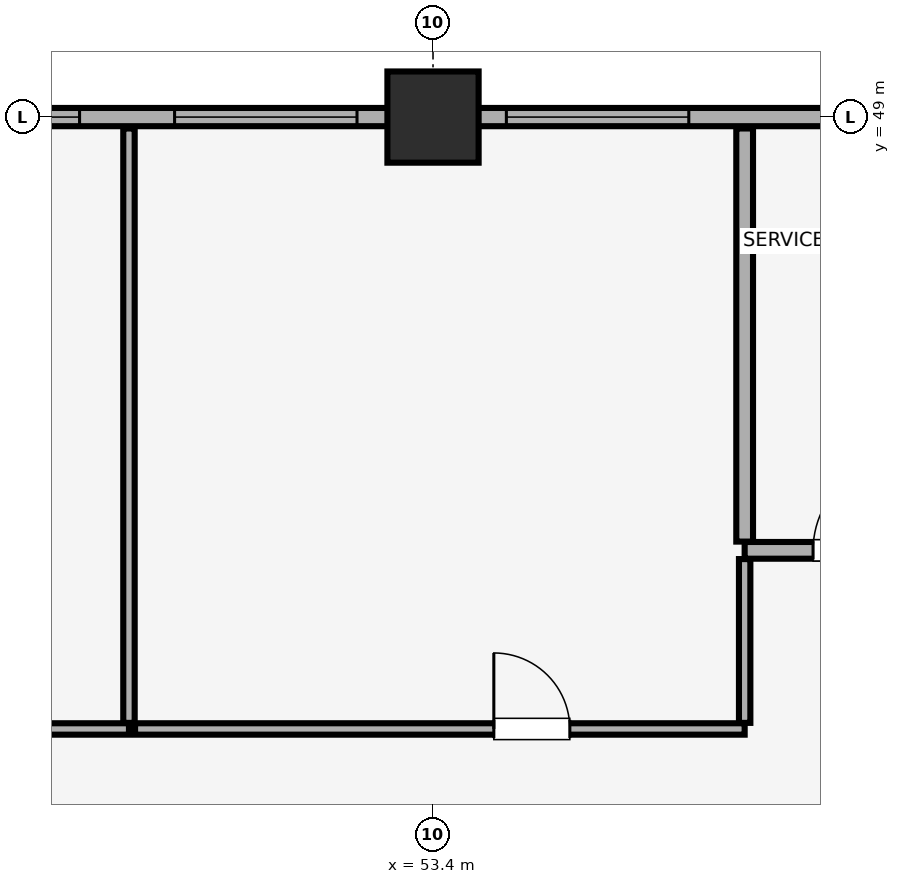
"""IFC4 building model, lengths in metres.
Left out: names, types, materials, properties, quantities, classifications, styles, units other than length and angle.
Written with IfcOpenShell. Run it as: python <this file> out.ifc"""

import sys

from ifc_helpers import new_model, si_unit, direction, frame, frame_2d, origin, origin_2d, place, context, subcontext, project, spatial, rectangle, extrude, element, fill, save


model = new_model("IFC4")
c1 = context("Model", 3, precision=1e-05, world=origin(), true_north=direction((0.0, 1.0)))
c2 = subcontext(c1, "Body", "Model", "MODEL_VIEW")
j1 = project(units=[si_unit("LENGTHUNIT", "METRE"), si_unit("PLANEANGLEUNIT", "RADIAN")], contexts=[c1])
p1 = place(None, origin())
s1 = spatial("IfcSite", under=j1, at=p1, CompositionType="ELEMENT")
p2 = place(p1, origin())
s2 = spatial("IfcBuilding", under=s1, at=p2, CompositionType="ELEMENT")
p3 = place(p2, frame((0.0, 0.0, 220.55)))
s3 = spatial("IfcBuildingStorey", under=s2, at=p3, CompositionType="ELEMENT", Elevation=220.55)
p4 = place(p3, frame((53.4, 49.0, 0.0), z_axis=(0.0, 0.0, 1.0), x_axis=(1.0, 0.0, 0.0)))
e1 = element("IfcColumn", 1, at=p4, inside=s3, PredefinedType="COLUMN", context=c2, shape_type="SweptSolid", body=[
    extrude(rectangle(XDim=1.2, YDim=1.2, at=origin_2d()), origin(), (0.0, 0.0, 1.0), 3.56),
])
p5 = place(p3, frame((77.0, 49.0, 0.0), z_axis=(0.0, 0.0, 1.0), x_axis=(-1.0, 0.0, 0.0)))
e2 = element("IfcWall", 2, at=p5, inside=s3, PredefinedType="SOLIDWALL", context=c2, shape_type="SweptSolid", body=[
    extrude(rectangle(XDim=70.0, YDim=0.24, at=frame_2d((35.0, 0.0))), origin(), (0.0, 0.0, 1.0), 2.76),
])
p6 = place(p5, frame((63.7, 0.0, 0.85)))
e3 = element("IfcOpeningElement", 3, at=p6, cuts=e2, PredefinedType="OPENING", context=c2, shape_type="SweptSolid", body=[
    extrude(rectangle(XDim=3.0, YDim=1.5, at=frame_2d((1.5, 0.75))), frame((0.0, 0.13, 0.0), z_axis=(0.0, -1.0, 0.0), x_axis=(1.0, 0.0, 0.0)), (0.0, 0.0, 1.0), 0.26),
])
p7 = place(p5, frame((3.3, 0.0, 0.85)))
e4 = element("IfcOpeningElement", 4, at=p7, cuts=e2, PredefinedType="OPENING", context=c2, shape_type="SweptSolid", body=[
    extrude(rectangle(XDim=3.0, YDim=1.5, at=frame_2d((1.5, 0.75))), frame((0.0, 0.13, 0.0), z_axis=(0.0, -1.0, 0.0), x_axis=(1.0, 0.0, 0.0)), (0.0, 0.0, 1.0), 0.26),
])
p8 = place(p5, frame((49.465, 0.0, 0.9)))
e5 = element("IfcOpeningElement", 5, at=p8, cuts=e2, PredefinedType="OPENING", context=c2, shape_type="SweptSolid", body=[
    extrude(rectangle(XDim=1.5, YDim=1.4, at=frame_2d((0.75, 0.7))), frame((0.0, 0.13, 0.0), z_axis=(0.0, -1.0, 0.0), x_axis=(1.0, 0.0, 0.0)), (0.0, 0.0, 1.0), 0.26),
])
p9 = place(p5, frame((41.65, 0.0, 0.9)))
e6 = element("IfcOpeningElement", 6, at=p9, cuts=e2, PredefinedType="OPENING", context=c2, shape_type="SweptSolid", body=[
    extrude(rectangle(XDim=3.6, YDim=1.5, at=frame_2d((1.8, 0.75))), frame((0.0, 0.13, 0.0), z_axis=(0.0, -1.0, 0.0), x_axis=(1.0, 0.0, 0.0)), (0.0, 0.0, 1.0), 0.26),
])
p10 = place(p5, frame((28.25, 0.0, 0.9)))
e7 = element("IfcOpeningElement", 7, at=p10, cuts=e2, PredefinedType="OPENING", context=c2, shape_type="SweptSolid", body=[
    extrude(rectangle(XDim=1.5, YDim=1.4, at=frame_2d((0.75, 0.7))), frame((0.0, 0.13, 0.0), z_axis=(0.0, -1.0, 0.0), x_axis=(1.0, 0.0, 0.0)), (0.0, 0.0, 1.0), 0.26),
])
p11 = place(p5, frame((24.6, 0.0, 0.9)))
e8 = element("IfcOpeningElement", 8, at=p11, cuts=e2, PredefinedType="OPENING", context=c2, shape_type="SweptSolid", body=[
    extrude(rectangle(XDim=2.4, YDim=1.5, at=frame_2d((1.2, 0.75))), frame((0.0, 0.13, 0.0), z_axis=(0.0, -1.0, 0.0), x_axis=(1.0, 0.0, 0.0)), (0.0, 0.0, 1.0), 0.26),
])
p12 = place(p5, frame((20.235, 0.0, 0.9)))
e9 = element("IfcOpeningElement", 9, at=p12, cuts=e2, PredefinedType="OPENING", context=c2, shape_type="SweptSolid", body=[
    extrude(rectangle(XDim=2.4, YDim=1.5, at=frame_2d((1.2, 0.75))), frame((0.0, 0.13, 0.0), z_axis=(0.0, -1.0, 0.0), x_axis=(1.0, 0.0, 0.0)), (0.0, 0.0, 1.0), 0.26),
])
p13 = place(p3, frame((57.5, 43.3, 0.0), z_axis=(0.0, 0.0, 1.0), x_axis=(1.0, 0.0, 0.0)))
e10 = element("IfcWall", 10, at=p13, inside=s3, PredefinedType="PARTITIONING", context=c2, shape_type="SweptSolid", body=[
    extrude(rectangle(XDim=3.04, YDim=0.22, at=frame_2d((1.52, 0.0))), origin(), (0.0, 0.0, 1.0), 3.56),
])
p14 = place(p13, frame((0.9, 0.0, 0.0)))
e11 = element("IfcOpeningElement", 11, at=p14, cuts=e10, PredefinedType="OPENING", context=c2, shape_type="SweptSolid", body=[
    extrude(rectangle(XDim=1.2, YDim=2.15, at=frame_2d((0.6, 1.075))), frame((0.0, 0.12, 0.0), z_axis=(0.0, -1.0, 0.0), x_axis=(1.0, 0.0, 0.0)), (0.0, 0.0, 1.0), 0.24),
])
p15 = place(p3, frame((57.5, 43.415, 0.0), z_axis=(0.0, 0.0, 1.0), x_axis=(0.0, 1.0, 0.0)))
e12 = element("IfcWall", 12, at=p15, inside=s3, PredefinedType="PARTITIONING", context=c2, shape_type="SweptSolid", body=[
    extrude(rectangle(XDim=5.435, YDim=0.22, at=frame_2d((2.718, 0.0))), origin(), (0.0, 0.0, 1.0), 3.56),
])
p16 = place(p3, frame((44.3, 40.95, 0.0), z_axis=(0.0, 0.0, 1.0), x_axis=(1.0, 0.0, 0.0)))
e13 = element("IfcWall", 13, at=p16, inside=s3, PredefinedType="PARTITIONING", context=c2, shape_type="SweptSolid", body=[
    extrude(rectangle(XDim=5.1, YDim=0.15, at=frame_2d((2.55, 0.0))), origin(), (0.0, 0.0, 1.0), 3.56),
])
p17 = place(p16, frame((2.875, 0.0, 0.0)))
e14 = element("IfcOpeningElement", 14, at=p17, cuts=e13, PredefinedType="OPENING", context=c2, shape_type="SweptSolid", body=[
    extrude(rectangle(XDim=0.85, YDim=2.1, at=frame_2d((0.425, 1.05))), frame((0.0, 0.085, 0.0), z_axis=(0.0, -1.0, 0.0), x_axis=(1.0, 0.0, 0.0)), (0.0, 0.0, 1.0), 0.17),
])
p18 = place(p3, frame((49.4, 41.03, 0.0), z_axis=(0.0, 0.0, 1.0), x_axis=(0.0, 1.0, 0.0)))
e15 = element("IfcWall", 15, at=p18, inside=s3, PredefinedType="PARTITIONING", context=c2, shape_type="SweptSolid", body=[
    extrude(rectangle(XDim=7.82, YDim=0.15, at=frame_2d((3.91, 0.0))), origin(), (0.0, 0.0, 1.0), 3.56),
])
p19 = place(p3, frame((49.48, 40.95, 0.0), z_axis=(0.0, 0.0, 1.0), x_axis=(1.0, 0.0, 0.0)))
e16 = element("IfcWall", 16, at=p19, inside=s3, PredefinedType="PARTITIONING", context=c2, shape_type="SweptSolid", body=[
    extrude(rectangle(XDim=8.02, YDim=0.15, at=frame_2d((4.01, 0.0))), origin(), (0.0, 0.0, 1.0), 3.56),
])
p20 = place(p19, frame((4.72, 0.0, 0.0)))
e17 = element("IfcOpeningElement", 17, at=p20, cuts=e16, PredefinedType="OPENING", context=c2, shape_type="SweptSolid", body=[
    extrude(rectangle(XDim=1.0, YDim=2.15, at=frame_2d((0.5, 1.075))), frame((0.0, 0.085, 0.0), z_axis=(0.0, -1.0, 0.0), x_axis=(1.0, 0.0, 0.0)), (0.0, 0.0, 1.0), 0.17),
])
p21 = place(p3, frame((57.5, 41.03, 0.0), z_axis=(0.0, 0.0, 1.0), x_axis=(0.0, 1.0, 0.0)))
e18 = element("IfcWall", 18, at=p21, inside=s3, PredefinedType="PARTITIONING", context=c2, shape_type="SweptSolid", body=[
    extrude(rectangle(XDim=2.155, YDim=0.15, at=frame_2d((1.078, 0.0))), origin(), (0.0, 0.0, 1.0), 3.56),
])
p22 = place(p10, origin())
e19 = element("IfcWindow", 19, at=p22, inside=s3, PartitioningType="SINGLE_PANEL", PredefinedType="WINDOW", context=c2, shape_type="SweptSolid", body=[
    extrude(rectangle(XDim=1.5, YDim=1.4, at=frame_2d((0.75, 0.7))), frame((0.0, 0.03, 0.0), z_axis=(0.0, -1.0, 0.0), x_axis=(1.0, 0.0, 0.0)), (0.0, 0.0, 1.0), 0.06),
])
fill(e7, e19)
p23 = place(p11, origin())
e20 = element("IfcWindow", 20, at=p23, inside=s3, PartitioningType="SINGLE_PANEL", PredefinedType="WINDOW", context=c2, shape_type="SweptSolid", body=[
    extrude(rectangle(XDim=2.4, YDim=1.5, at=frame_2d((1.2, 0.75))), frame((0.0, 0.03, 0.0), z_axis=(0.0, -1.0, 0.0), x_axis=(1.0, 0.0, 0.0)), (0.0, 0.0, 1.0), 0.06),
])
fill(e8, e20)
p24 = place(p12, origin())
e21 = element("IfcWindow", 21, at=p24, inside=s3, PartitioningType="SINGLE_PANEL", PredefinedType="WINDOW", context=c2, shape_type="SweptSolid", body=[
    extrude(rectangle(XDim=2.4, YDim=1.5, at=frame_2d((1.2, 0.75))), frame((0.0, 0.03, 0.0), z_axis=(0.0, -1.0, 0.0), x_axis=(1.0, 0.0, 0.0)), (0.0, 0.0, 1.0), 0.06),
])
fill(e9, e21)
p25 = place(p14, origin())
e22 = element("IfcDoor", 22, at=p25, inside=s3, OperationType="SINGLE_SWING_RIGHT", PredefinedType="DOOR", context=c2, shape_type="SweptSolid", body=[
    extrude(rectangle(XDim=1.2, YDim=2.15, at=frame_2d((0.6, 1.075))), frame((0.0, 0.025, 0.0), z_axis=(0.0, -1.0, 0.0), x_axis=(1.0, 0.0, 0.0)), (0.0, 0.0, 1.0), 0.05),
])
fill(e11, e22)
p26 = place(p20, origin())
e23 = element("IfcDoor", 23, at=p26, inside=s3, OperationType="SINGLE_SWING_LEFT", PredefinedType="DOOR", context=c2, shape_type="SweptSolid", body=[
    extrude(rectangle(XDim=1.0, YDim=2.15, at=frame_2d((0.5, 1.075))), frame((0.0, 0.025, 0.0), z_axis=(0.0, -1.0, 0.0), x_axis=(1.0, 0.0, 0.0)), (0.0, 0.0, 1.0), 0.05),
])
fill(e17, e23)
save(model, sys.argv[1])
